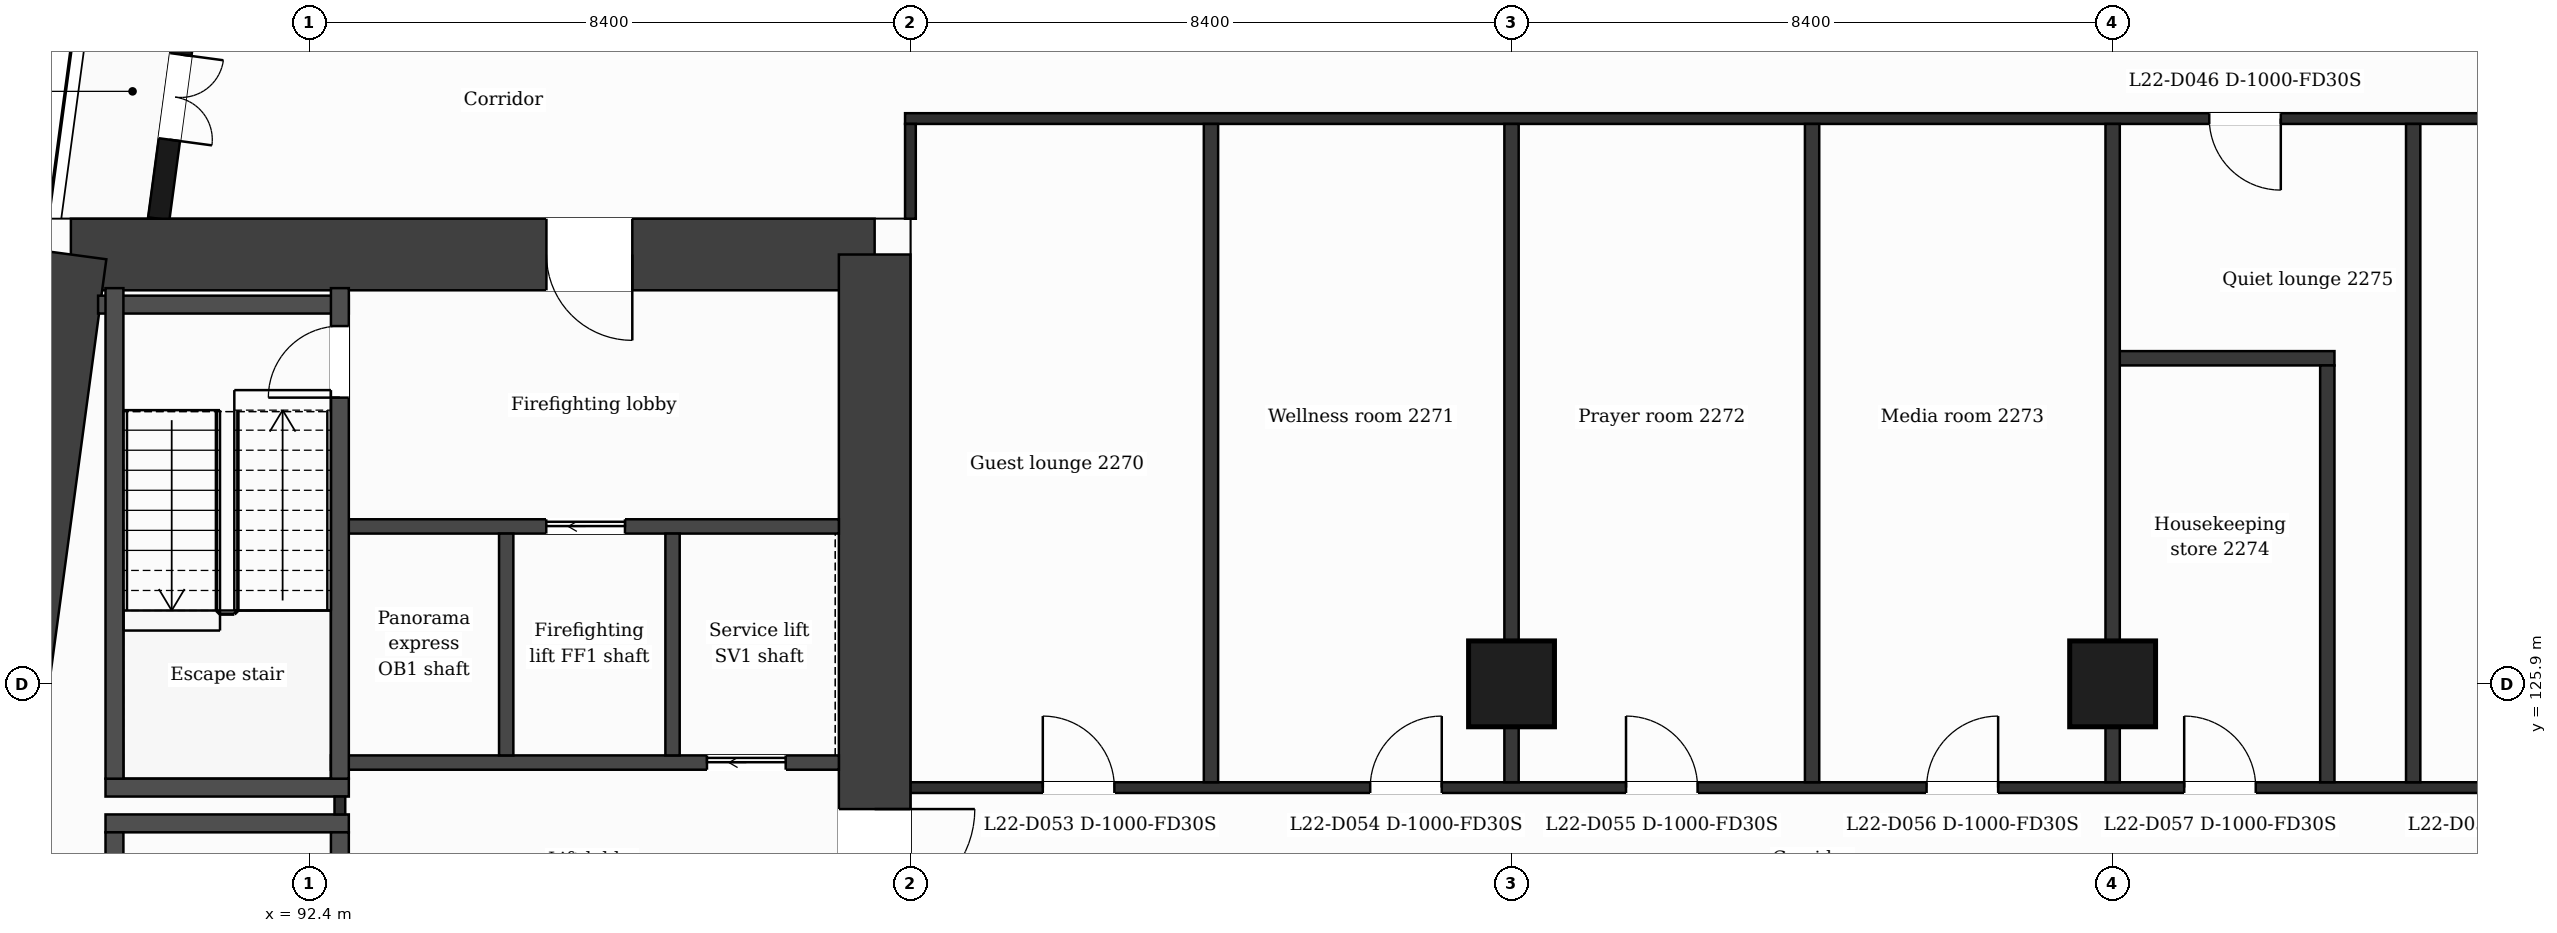
"""IFC4 building model, lengths in metres.
Left out: names, types, materials, properties, quantities, classifications, styles, units other than length and angle.
Written with IfcOpenShell. Run it as: python <this file> out.ifc"""

import sys

from ifc_helpers import new_model, si_unit, direction, frame, frame_2d, origin, origin_2d, place, context, subcontext, project, spatial, rectangle, extrude, element, fill, save


model = new_model("IFC4")
c1 = context("Model", 3, precision=1e-05, world=origin(), true_north=direction((0.0, 1.0)))
c2 = subcontext(c1, "Body", "Model", "MODEL_VIEW")
j1 = project(units=[si_unit("LENGTHUNIT", "METRE"), si_unit("PLANEANGLEUNIT", "RADIAN")], contexts=[c1])
p1 = place(None, origin())
s1 = spatial("IfcSite", under=j1, at=p1, CompositionType="ELEMENT")
p2 = place(p1, origin())
s2 = spatial("IfcBuilding", under=s1, at=p2, CompositionType="ELEMENT")
p3 = place(p2, frame((0.0, 0.0, 98.4)))
s3 = spatial("IfcBuildingStorey", under=s2, at=p3, CompositionType="ELEMENT", Elevation=98.4)
p4 = place(p3, frame((89.068, 131.9, 0.0), z_axis=(0.0, 0.0, 1.0), x_axis=(1.0, 0.0, 0.0)))
e1 = element("IfcWall", 1, at=p4, inside=s3, PredefinedType="SHEAR", context=c2, shape_type="SweptSolid", body=[
    extrude(rectangle(XDim=11.232, YDim=1.0, at=frame_2d((5.616, 0.0))), origin(), (0.0, 0.0, 1.0), 3.7),
])
p5 = place(p4, frame((6.646, 0.0, 0.0)))
e2 = element("IfcOpeningElement", 2, at=p5, cuts=e1, PredefinedType="OPENING", context=c2, shape_type="SweptSolid", body=[
    extrude(rectangle(XDim=1.2, YDim=2.1, at=frame_2d((0.6, 1.05))), frame((0.0, 0.51, 0.0), z_axis=(0.0, -1.0, 0.0), x_axis=(1.0, 0.0, 0.0)), (0.0, 0.0, 1.0), 1.02),
])
p6 = place(p3, frame((100.3, 131.9, 0.0), z_axis=(0.0, 0.0, 1.0), x_axis=(0.0, -1.0, 0.0)))
e3 = element("IfcWall", 3, at=p6, inside=s3, PredefinedType="SHEAR", context=c2, shape_type="SweptSolid", body=[
    extrude(rectangle(XDim=21.0, YDim=1.0, at=frame_2d((10.5, 0.0))), origin(), (0.0, 0.0, 1.0), 3.7),
])
p7 = place(p6, frame((7.75, 0.0, 0.0)))
e4 = element("IfcOpeningElement", 4, at=p7, cuts=e3, PredefinedType="OPENING", context=c2, shape_type="SweptSolid", body=[
    extrude(rectangle(XDim=1.4, YDim=2.1, at=frame_2d((0.7, 1.05))), frame((0.0, 0.51, 0.0), z_axis=(0.0, -1.0, 0.0), x_axis=(1.0, 0.0, 0.0)), (0.0, 0.0, 1.0), 1.02),
])
p8 = place(p3, frame((86.241, 110.9, 0.0), z_axis=(0.0, 0.0, 1.0), x_axis=(0.133411141623, 0.991060778808, 0.0)))
e5 = element("IfcWall", 5, at=p8, inside=s3, PredefinedType="SHEAR", context=c2, shape_type="SweptSolid", body=[
    extrude(rectangle(XDim=21.189, YDim=1.0, at=frame_2d((10.595, 0.0))), origin(), (0.0, 0.0, 1.0), 3.7),
])
for number, where, z_axis, x_axis in (
    (6, (109.2, 125.9, 0.0), (0.0, 0.0, 1.0), (1.0, 0.0, 0.0)),
    (7, (117.6, 125.9, 0.0), (0.0, 0.0, 1.0), (1.0, 0.0, 0.0)),
):
    element("IfcColumn", number, at=place(p3, frame(where, z_axis=z_axis, x_axis=x_axis)), inside=s3, PredefinedType="COLUMN", context=c2, shape_type="SweptSolid", body=[
        extrude(rectangle(XDim=1.2, YDim=1.2, at=origin_2d()), origin(), (0.0, 0.0, 1.0), 3.7),
    ])
p9 = place(p3, frame((91.177, 138.95, 0.0), z_axis=(0.0, 0.0, 1.0), x_axis=(-0.133426664613, -0.991058689065, 0.0)))
e8 = element("IfcWall", 8, at=p9, inside=s3, PredefinedType="SOLIDWALL", context=c2, shape_type="SweptSolid", body=[
    extrude(rectangle(XDim=6.609, YDim=0.3, at=frame_2d((3.305, 0.0))), origin(), (0.0, 0.0, 1.0), 3.38),
])
p10 = place(p9, frame((1.039, 0.0, 0.9)))
e9 = element("IfcOpeningElement", 9, at=p10, cuts=e8, PredefinedType="OPENING", context=c2, shape_type="SweptSolid", body=[
    extrude(rectangle(XDim=1.2, YDim=2.1, at=frame_2d((0.6, 1.05))), frame((0.0, 0.16, 0.0), z_axis=(0.0, -1.0, 0.0), x_axis=(1.0, 0.0, 0.0)), (0.0, 0.0, 1.0), 0.32),
])
p11 = place(p9, frame((4.294, 0.0, 0.0)))
e10 = element("IfcOpeningElement", 10, at=p11, cuts=e8, PredefinedType="OPENING", context=c2, shape_type="SweptSolid", body=[
    extrude(rectangle(XDim=1.2, YDim=2.4, at=frame_2d((0.6, 1.2))), frame((0.0, 0.16, 0.0), z_axis=(0.0, -1.0, 0.0), x_axis=(1.0, 0.0, 0.0)), (0.0, 0.0, 1.0), 0.32),
])
for number, where, z_axis, x_axis in (
    (11, (89.552, 123.95, 0.0), (0.0, 0.0, 1.0), (1.0, 0.0, 0.0)),
    (12, (89.552, 124.45, 0.0), (0.0, 0.0, 1.0), (1.0, 0.0, 0.0)),
):
    element("IfcWall", number, at=place(p3, frame(where, z_axis=z_axis, x_axis=x_axis)), inside=s3, PredefinedType="PARTITIONING", context=c2, shape_type="SweptSolid", body=[
        extrude(rectangle(XDim=3.4, YDim=0.25, at=frame_2d((1.7, 0.0))), origin(), (0.0, 0.0, 1.0), 3.38),
    ])
p12 = place(p3, frame((100.8, 124.45, 0.0), z_axis=(0.0, 0.0, 1.0), x_axis=(1.0, 0.0, 0.0)))
e13 = element("IfcWall", 13, at=p12, inside=s3, PredefinedType="PARTITIONING", context=c2, shape_type="SweptSolid", body=[
    extrude(rectangle(XDim=25.2, YDim=0.15, at=frame_2d((12.6, 0.0))), origin(), (0.0, 0.0, 1.0), 3.38),
])
p13 = place(p12, frame((1.85, 0.0, 0.0)))
e14 = element("IfcOpeningElement", 14, at=p13, cuts=e13, PredefinedType="OPENING", context=c2, shape_type="SweptSolid", body=[
    extrude(rectangle(XDim=1.0, YDim=2.1, at=frame_2d((0.5, 1.05))), frame((0.0, 0.085, 0.0), z_axis=(0.0, -1.0, 0.0), x_axis=(1.0, 0.0, 0.0)), (0.0, 0.0, 1.0), 0.17),
])
p14 = place(p12, frame((6.425, 0.0, 0.0)))
e15 = element("IfcOpeningElement", 15, at=p14, cuts=e13, PredefinedType="OPENING", context=c2, shape_type="SweptSolid", body=[
    extrude(rectangle(XDim=1.0, YDim=2.1, at=frame_2d((0.5, 1.05))), frame((0.0, 0.085, 0.0), z_axis=(0.0, -1.0, 0.0), x_axis=(1.0, 0.0, 0.0)), (0.0, 0.0, 1.0), 0.17),
])
p15 = place(p12, frame((10.0, 0.0, 0.0)))
e16 = element("IfcOpeningElement", 16, at=p15, cuts=e13, PredefinedType="OPENING", context=c2, shape_type="SweptSolid", body=[
    extrude(rectangle(XDim=1.0, YDim=2.1, at=frame_2d((0.5, 1.05))), frame((0.0, 0.085, 0.0), z_axis=(0.0, -1.0, 0.0), x_axis=(1.0, 0.0, 0.0)), (0.0, 0.0, 1.0), 0.17),
])
p16 = place(p12, frame((14.2, 0.0, 0.0)))
e17 = element("IfcOpeningElement", 17, at=p16, cuts=e13, PredefinedType="OPENING", context=c2, shape_type="SweptSolid", body=[
    extrude(rectangle(XDim=1.0, YDim=2.1, at=frame_2d((0.5, 1.05))), frame((0.0, 0.085, 0.0), z_axis=(0.0, -1.0, 0.0), x_axis=(1.0, 0.0, 0.0)), (0.0, 0.0, 1.0), 0.17),
])
p17 = place(p12, frame((17.8, 0.0, 0.0)))
e18 = element("IfcOpeningElement", 18, at=p17, cuts=e13, PredefinedType="OPENING", context=c2, shape_type="SweptSolid", body=[
    extrude(rectangle(XDim=1.0, YDim=2.1, at=frame_2d((0.5, 1.05))), frame((0.0, 0.085, 0.0), z_axis=(0.0, -1.0, 0.0), x_axis=(1.0, 0.0, 0.0)), (0.0, 0.0, 1.0), 0.17),
])
p18 = place(p12, frame((22.85, 0.0, 0.0)))
e19 = element("IfcOpeningElement", 19, at=p18, cuts=e13, PredefinedType="OPENING", context=c2, shape_type="SweptSolid", body=[
    extrude(rectangle(XDim=1.0, YDim=2.1, at=frame_2d((0.5, 1.05))), frame((0.0, 0.085, 0.0), z_axis=(0.0, -1.0, 0.0), x_axis=(1.0, 0.0, 0.0)), (0.0, 0.0, 1.0), 0.17),
])
p19 = place(p3, frame((92.702, 124.8, 0.0), z_axis=(0.0, 0.0, 1.0), x_axis=(1.0, 0.0, 0.0)))
e20 = element("IfcWall", 20, at=p19, inside=s3, PredefinedType="PARTITIONING", context=c2, shape_type="SweptSolid", body=[
    extrude(rectangle(XDim=7.098, YDim=0.2, at=frame_2d((3.549, 0.0))), origin(), (0.0, 0.0, 1.0), 3.38),
])
p20 = place(p19, frame((5.255, 0.0, 0.0)))
e21 = element("IfcOpeningElement", 21, at=p20, cuts=e20, PredefinedType="OPENING", context=c2, shape_type="SweptSolid", body=[
    extrude(rectangle(XDim=1.1, YDim=2.1, at=frame_2d((0.55, 1.05))), frame((0.0, 0.11, 0.0), z_axis=(0.0, -1.0, 0.0), x_axis=(1.0, 0.0, 0.0)), (0.0, 0.0, 1.0), 0.22),
])
p21 = place(p3, frame((92.827, 128.1, 0.0), z_axis=(0.0, 0.0, 1.0), x_axis=(1.0, 0.0, 0.0)))
e22 = element("IfcWall", 22, at=p21, inside=s3, PredefinedType="PARTITIONING", context=c2, shape_type="SweptSolid", body=[
    extrude(rectangle(XDim=6.973, YDim=0.2, at=frame_2d((3.487, 0.0))), origin(), (0.0, 0.0, 1.0), 3.38),
])
p22 = place(p21, frame((2.884, 0.0, 0.0)))
e23 = element("IfcOpeningElement", 23, at=p22, cuts=e22, PredefinedType="OPENING", context=c2, shape_type="SweptSolid", body=[
    extrude(rectangle(XDim=1.1, YDim=2.1, at=frame_2d((0.55, 1.05))), frame((0.0, 0.11, 0.0), z_axis=(0.0, -1.0, 0.0), x_axis=(1.0, 0.0, 0.0)), (0.0, 0.0, 1.0), 0.22),
])
p23 = place(p3, frame((117.6, 130.45, 0.0), z_axis=(0.0, 0.0, 1.0), x_axis=(1.0, 0.0, 0.0)))
e24 = element("IfcWall", 24, at=p23, inside=s3, PredefinedType="PARTITIONING", context=c2, shape_type="SweptSolid", body=[
    extrude(rectangle(XDim=3.1, YDim=0.2, at=frame_2d((1.55, 0.0))), origin(), (0.0, 0.0, 1.0), 3.38),
])
p24 = place(p3, frame((89.448, 131.2, 0.0), z_axis=(0.0, 0.0, 1.0), x_axis=(1.0, 0.0, 0.0)))
e25 = element("IfcWall", 25, at=p24, inside=s3, PredefinedType="PARTITIONING", context=c2, shape_type="SweptSolid", body=[
    extrude(rectangle(XDim=3.504, YDim=0.25, at=frame_2d((1.752, 0.0))), origin(), (0.0, 0.0, 1.0), 3.38),
])
p25 = place(p3, frame((100.725, 133.8, 0.0), z_axis=(0.0, 0.0, 1.0), x_axis=(1.0, 0.0, 0.0)))
e26 = element("IfcWall", 26, at=p25, inside=s3, PredefinedType="PARTITIONING", context=c2, shape_type="SweptSolid", body=[
    extrude(rectangle(XDim=25.35, YDim=0.15, at=frame_2d((12.675, 0.0))), origin(), (0.0, 0.0, 1.0), 3.38),
])
p26 = place(p25, frame((18.225, 0.0, 0.0)))
e27 = element("IfcOpeningElement", 27, at=p26, cuts=e26, PredefinedType="OPENING", context=c2, shape_type="SweptSolid", body=[
    extrude(rectangle(XDim=1.0, YDim=2.1, at=frame_2d((0.5, 1.05))), frame((0.0, 0.085, 0.0), z_axis=(0.0, -1.0, 0.0), x_axis=(1.0, 0.0, 0.0)), (0.0, 0.0, 1.0), 0.17),
])
for number, where, z_axis, x_axis in (
    (28, (89.677, 116.97, 0.0), (0.0, 0.0, 1.0), (0.0, 1.0, 0.0)),
    (29, (89.677, 124.575, 0.0), (0.0, 0.0, 1.0), (0.0, 1.0, 0.0)),
):
    element("IfcWall", number, at=place(p3, frame(where, z_axis=z_axis, x_axis=x_axis)), inside=s3, PredefinedType="PARTITIONING", context=c2, shape_type="SweptSolid", body=[
        extrude(rectangle(XDim=6.855, YDim=0.25, at=frame_2d((3.427, 0.0))), origin(), (0.0, 0.0, 1.0), 3.38),
    ])
p27 = place(p3, frame((92.827, 124.075, 0.0), z_axis=(0.0, 0.0, 1.0), x_axis=(0.0, 1.0, 0.0)))
e30 = element("IfcWall", 30, at=p27, inside=s3, PredefinedType="PARTITIONING", context=c2, shape_type="SweptSolid", body=[
    extrude(rectangle(XDim=0.25, YDim=0.15, at=frame_2d((0.125, 0.0))), origin(), (0.0, 0.0, 1.0), 3.38),
])
p28 = place(p3, frame((92.827, 116.97, 0.0), z_axis=(0.0, 0.0, 1.0), x_axis=(0.0, 1.0, 0.0)))
e31 = element("IfcWall", 31, at=p28, inside=s3, PredefinedType="PARTITIONING", context=c2, shape_type="SweptSolid", body=[
    extrude(rectangle(XDim=6.855, YDim=0.25, at=frame_2d((3.427, 0.0))), origin(), (0.0, 0.0, 1.0), 3.38),
])
p29 = place(p28, frame((5.555, 0.0, 0.0)))
e32 = element("IfcOpeningElement", 32, at=p29, cuts=e31, PredefinedType="OPENING", context=c2, shape_type="SweptSolid", body=[
    extrude(rectangle(XDim=0.95, YDim=2.1, at=frame_2d((0.475, 1.05))), frame((0.0, 0.135, 0.0), z_axis=(0.0, -1.0, 0.0), x_axis=(1.0, 0.0, 0.0)), (0.0, 0.0, 1.0), 0.27),
])
p30 = place(p3, frame((92.827, 124.575, 0.0), z_axis=(0.0, 0.0, 1.0), x_axis=(0.0, 1.0, 0.0)))
e33 = element("IfcWall", 33, at=p30, inside=s3, PredefinedType="PARTITIONING", context=c2, shape_type="SweptSolid", body=[
    extrude(rectangle(XDim=6.855, YDim=0.25, at=frame_2d((3.427, 0.0))), origin(), (0.0, 0.0, 1.0), 3.38),
])
p31 = place(p30, frame((5.325, 0.0, 0.0)))
e34 = element("IfcOpeningElement", 34, at=p31, cuts=e33, PredefinedType="OPENING", context=c2, shape_type="SweptSolid", body=[
    extrude(rectangle(XDim=1.0, YDim=2.1, at=frame_2d((0.5, 1.05))), frame((0.0, 0.135, 0.0), z_axis=(0.0, -1.0, 0.0), x_axis=(1.0, 0.0, 0.0)), (0.0, 0.0, 1.0), 0.27),
])
for number, where, z_axis, x_axis in (
    (35, (95.151, 124.9, 0.0), (0.0, 0.0, 1.0), (0.0, 1.0, 0.0)),
    (36, (97.476, 124.9, 0.0), (0.0, 0.0, 1.0), (0.0, 1.0, 0.0)),
):
    element("IfcWall", number, at=place(p3, frame(where, z_axis=z_axis, x_axis=x_axis)), inside=s3, PredefinedType="PARTITIONING", context=c2, shape_type="SweptSolid", body=[
        extrude(rectangle(XDim=3.1, YDim=0.2, at=frame_2d((1.55, 0.0))), origin(), (0.0, 0.0, 1.0), 3.38),
    ])
p32 = place(p3, frame((100.8, 132.4, 0.0), z_axis=(0.0, 0.0, 1.0), x_axis=(0.0, 1.0, 0.0)))
e37 = element("IfcWall", 37, at=p32, inside=s3, PredefinedType="PARTITIONING", context=c2, shape_type="SweptSolid", body=[
    extrude(rectangle(XDim=1.325, YDim=0.15, at=frame_2d((0.663, 0.0))), origin(), (0.0, 0.0, 1.0), 3.38),
])
for number, where, z_axis, x_axis in (
    (38, (105.0, 124.525, 0.0), (0.0, 0.0, 1.0), (0.0, 1.0, 0.0)),
    (39, (109.2, 124.525, 0.0), (0.0, 0.0, 1.0), (0.0, 1.0, 0.0)),
    (40, (113.4, 124.525, 0.0), (0.0, 0.0, 1.0), (0.0, 1.0, 0.0)),
    (41, (117.6, 124.525, 0.0), (0.0, 0.0, 1.0), (0.0, 1.0, 0.0)),
):
    element("IfcWall", number, at=place(p3, frame(where, z_axis=z_axis, x_axis=x_axis)), inside=s3, PredefinedType="PARTITIONING", context=c2, shape_type="SweptSolid", body=[
        extrude(rectangle(XDim=9.2, YDim=0.2, at=frame_2d((4.6, 0.0))), origin(), (0.0, 0.0, 1.0), 3.38),
    ])
p33 = place(p3, frame((120.6, 124.525, 0.0), z_axis=(0.0, 0.0, 1.0), x_axis=(0.0, 1.0, 0.0)))
e42 = element("IfcWall", 42, at=p33, inside=s3, PredefinedType="PARTITIONING", context=c2, shape_type="SweptSolid", body=[
    extrude(rectangle(XDim=5.825, YDim=0.2, at=frame_2d((2.913, 0.0))), origin(), (0.0, 0.0, 1.0), 3.38),
])
p34 = place(p3, frame((121.8, 124.525, 0.0), z_axis=(0.0, 0.0, 1.0), x_axis=(0.0, 1.0, 0.0)))
e43 = element("IfcWall", 43, at=p34, inside=s3, PredefinedType="PARTITIONING", context=c2, shape_type="SweptSolid", body=[
    extrude(rectangle(XDim=9.2, YDim=0.2, at=frame_2d((4.6, 0.0))), origin(), (0.0, 0.0, 1.0), 3.38),
])
p35 = place(p11, origin())
e44 = element("IfcDoor", 44, at=p35, inside=s3, OperationType="DOUBLE_DOOR_SINGLE_SWING", PredefinedType="DOOR", context=c2, shape_type="SweptSolid", body=[
    extrude(rectangle(XDim=1.2, YDim=2.4, at=frame_2d((0.6, 1.2))), frame((0.0, 0.025, 0.0), z_axis=(0.0, -1.0, 0.0), x_axis=(1.0, 0.0, 0.0)), (0.0, 0.0, 1.0), 0.05),
])
fill(e10, e44)
p36 = place(p22, origin())
e45 = element("IfcDoor", 45, at=p36, inside=s3, OperationType="SLIDING_TO_LEFT", PredefinedType="DOOR", context=c2, shape_type="SweptSolid", body=[
    extrude(rectangle(XDim=1.1, YDim=2.1, at=frame_2d((0.55, 1.05))), frame((0.0, 0.025, 0.0), z_axis=(0.0, -1.0, 0.0), x_axis=(1.0, 0.0, 0.0)), (0.0, 0.0, 1.0), 0.05),
])
fill(e23, e45)
p37 = place(p20, origin())
e46 = element("IfcDoor", 46, at=p37, inside=s3, OperationType="SLIDING_TO_LEFT", PredefinedType="DOOR", context=c2, shape_type="SweptSolid", body=[
    extrude(rectangle(XDim=1.1, YDim=2.1, at=frame_2d((0.55, 1.05))), frame((0.0, 0.025, 0.0), z_axis=(0.0, -1.0, 0.0), x_axis=(1.0, 0.0, 0.0)), (0.0, 0.0, 1.0), 0.05),
])
fill(e21, e46)
p38 = place(p31, origin())
e47 = element("IfcDoor", 47, at=p38, inside=s3, OperationType="SINGLE_SWING_LEFT", PredefinedType="DOOR", context=c2, shape_type="SweptSolid", body=[
    extrude(rectangle(XDim=1.0, YDim=2.1, at=frame_2d((0.5, 1.05))), frame((0.0, 0.025, 0.0), z_axis=(0.0, -1.0, 0.0), x_axis=(1.0, 0.0, 0.0)), (0.0, 0.0, 1.0), 0.05),
])
fill(e34, e47)
p39 = place(p26, origin())
e48 = element("IfcDoor", 48, at=p39, inside=s3, OperationType="SINGLE_SWING_RIGHT", PredefinedType="DOOR", context=c2, shape_type="SweptSolid", body=[
    extrude(rectangle(XDim=1.0, YDim=2.1, at=frame_2d((0.5, 1.05))), frame((0.0, 0.025, 0.0), z_axis=(0.0, -1.0, 0.0), x_axis=(1.0, 0.0, 0.0)), (0.0, 0.0, 1.0), 0.05),
])
fill(e27, e48)
p40 = place(p13, origin())
e49 = element("IfcDoor", 49, at=p40, inside=s3, OperationType="SINGLE_SWING_LEFT", PredefinedType="DOOR", context=c2, shape_type="SweptSolid", body=[
    extrude(rectangle(XDim=1.0, YDim=2.1, at=frame_2d((0.5, 1.05))), frame((0.0, 0.025, 0.0), z_axis=(0.0, -1.0, 0.0), x_axis=(1.0, 0.0, 0.0)), (0.0, 0.0, 1.0), 0.05),
])
fill(e14, e49)
p41 = place(p14, origin())
e50 = element("IfcDoor", 50, at=p41, inside=s3, OperationType="SINGLE_SWING_RIGHT", PredefinedType="DOOR", context=c2, shape_type="SweptSolid", body=[
    extrude(rectangle(XDim=1.0, YDim=2.1, at=frame_2d((0.5, 1.05))), frame((0.0, 0.025, 0.0), z_axis=(0.0, -1.0, 0.0), x_axis=(1.0, 0.0, 0.0)), (0.0, 0.0, 1.0), 0.05),
])
fill(e15, e50)
p42 = place(p15, origin())
e51 = element("IfcDoor", 51, at=p42, inside=s3, OperationType="SINGLE_SWING_LEFT", PredefinedType="DOOR", context=c2, shape_type="SweptSolid", body=[
    extrude(rectangle(XDim=1.0, YDim=2.1, at=frame_2d((0.5, 1.05))), frame((0.0, 0.025, 0.0), z_axis=(0.0, -1.0, 0.0), x_axis=(1.0, 0.0, 0.0)), (0.0, 0.0, 1.0), 0.05),
])
fill(e16, e51)
p43 = place(p16, origin())
e52 = element("IfcDoor", 52, at=p43, inside=s3, OperationType="SINGLE_SWING_RIGHT", PredefinedType="DOOR", context=c2, shape_type="SweptSolid", body=[
    extrude(rectangle(XDim=1.0, YDim=2.1, at=frame_2d((0.5, 1.05))), frame((0.0, 0.025, 0.0), z_axis=(0.0, -1.0, 0.0), x_axis=(1.0, 0.0, 0.0)), (0.0, 0.0, 1.0), 0.05),
])
fill(e17, e52)
p44 = place(p17, origin())
e53 = element("IfcDoor", 53, at=p44, inside=s3, OperationType="SINGLE_SWING_LEFT", PredefinedType="DOOR", context=c2, shape_type="SweptSolid", body=[
    extrude(rectangle(XDim=1.0, YDim=2.1, at=frame_2d((0.5, 1.05))), frame((0.0, 0.025, 0.0), z_axis=(0.0, -1.0, 0.0), x_axis=(1.0, 0.0, 0.0)), (0.0, 0.0, 1.0), 0.05),
])
fill(e18, e53)
p45 = place(p5, origin())
e54 = element("IfcDoor", 54, at=p45, inside=s3, OperationType="SINGLE_SWING_RIGHT", PredefinedType="DOOR", context=c2, shape_type="SweptSolid", body=[
    extrude(rectangle(XDim=1.2, YDim=2.1, at=frame_2d((0.6, 1.05))), frame((0.0, 0.025, 0.0), z_axis=(0.0, -1.0, 0.0), x_axis=(1.0, 0.0, 0.0)), (0.0, 0.0, 1.0), 0.05),
])
fill(e2, e54)
p46 = place(p7, origin())
e55 = element("IfcDoor", 55, at=p46, inside=s3, OperationType="SINGLE_SWING_LEFT", PredefinedType="DOOR", context=c2, shape_type="SweptSolid", body=[
    extrude(rectangle(XDim=1.4, YDim=2.1, at=frame_2d((0.7, 1.05))), frame((0.0, 0.025, 0.0), z_axis=(0.0, -1.0, 0.0), x_axis=(1.0, 0.0, 0.0)), (0.0, 0.0, 1.0), 0.05),
])
fill(e4, e55)
save(model, sys.argv[1])
